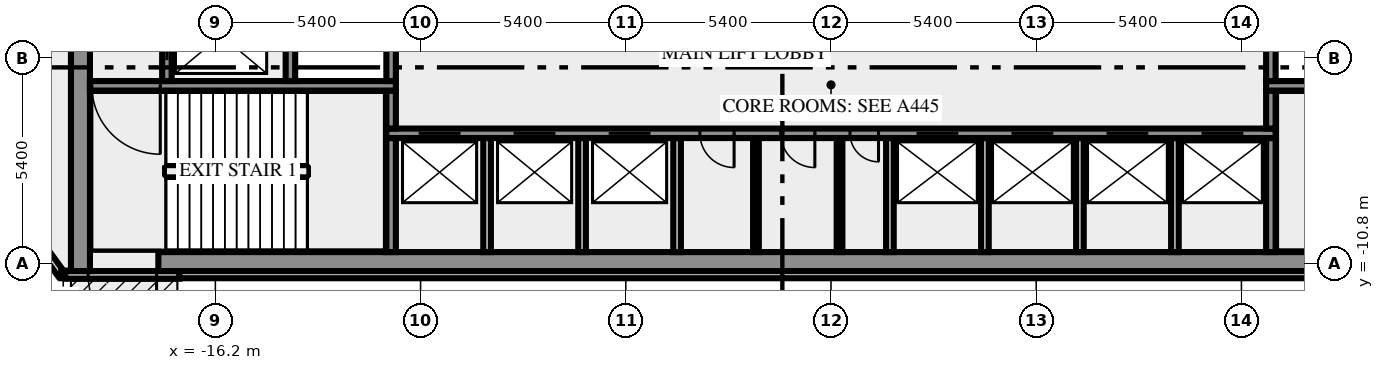
"""IFC4 building model, lengths in metres.
Left out: names, types, materials, properties, quantities, classifications, styles, units other than length and angle.
Written with IfcOpenShell. Run it as: python <this file> out.ifc"""

import sys

from ifc_helpers import new_model, si_unit, direction, frame, frame_2d, origin, place, context, subcontext, project, spatial, rectangle, extrude, element, fill, save


model = new_model("IFC4")
c1 = context("Model", 3, precision=1e-05, world=origin(), true_north=direction((0.0, 1.0)))
c2 = subcontext(c1, "Body", "Model", "MODEL_VIEW")
j1 = project(units=[si_unit("LENGTHUNIT", "METRE"), si_unit("PLANEANGLEUNIT", "RADIAN")], contexts=[c1])
p1 = place(None, origin())
s1 = spatial("IfcSite", under=j1, at=p1, CompositionType="ELEMENT")
p2 = place(p1, origin())
s2 = spatial("IfcBuilding", under=s1, at=p2, CompositionType="ELEMENT")
p3 = place(p2, origin())
s3 = spatial("IfcBuildingStorey", under=s2, at=p3, CompositionType="ELEMENT", Elevation=0.0)
p4 = place(p3, frame((-21.833, -8.909, 0.0), z_axis=(0.0, 0.0, 1.0), x_axis=(0.587766567315, -0.809030569476, 0.0)))
e1 = element("IfcWall", 1, at=p4, inside=s3, PredefinedType="SOLIDWALL", context=c2, shape_type="SweptSolid", body=[
    extrude(rectangle(XDim=2.688, YDim=0.2, at=frame_2d((1.344, 0.0))), origin(), (0.0, 0.0, 1.0), 5.6),
])
p5 = place(p3, frame((-20.256, -11.088, 0.0), z_axis=(0.0, 0.0, 1.0), x_axis=(1.0, 0.0, 0.0)))
e2 = element("IfcWall", 2, at=p5, inside=s3, PredefinedType="SOLIDWALL", context=c2, shape_type="SweptSolid", body=[
    extrude(rectangle(XDim=0.105, YDim=0.2, at=frame_2d((0.053, 0.0))), origin(), (0.0, 0.0, 1.0), 5.6),
])
p6 = place(p3, frame((-17.143, -11.1, 0.0), z_axis=(0.0, 0.0, 1.0), x_axis=(-1.0, 0.0, 0.0)))
e3 = element("IfcWall", 3, at=p6, inside=s3, PredefinedType="SOLIDWALL", context=c2, shape_type="SweptSolid", body=[
    extrude(rectangle(XDim=3.008, YDim=0.2, at=frame_2d((1.504, 0.0))), origin(), (0.0, 0.0, 1.0), 5.6),
])
p7 = place(p6, frame((0.604, 0.0, 0.0)))
e4 = element("IfcOpeningElement", 4, at=p7, cuts=e3, PredefinedType="OPENING", context=c2, shape_type="SweptSolid", body=[
    extrude(rectangle(XDim=1.8, YDim=2.2, at=frame_2d((0.9, 1.1))), frame((0.0, 0.11, 0.0), z_axis=(0.0, -1.0, 0.0), x_axis=(1.0, 0.0, 0.0)), (0.0, 0.0, 1.0), 0.22),
])
p8 = place(p3, frame((-17.143, -11.088, 0.0), z_axis=(0.0, 0.0, 1.0), x_axis=(1.0, 0.0, 0.0)))
e5 = element("IfcWall", 5, at=p8, inside=s3, PredefinedType="SOLIDWALL", context=c2, shape_type="SweptSolid", body=[
    extrude(rectangle(XDim=34.287, YDim=0.2, at=frame_2d((17.143, 0.0))), origin(), (0.0, 0.0, 1.0), 5.6),
])
p9 = place(p3, frame((-19.75, -11.0, 0.0), z_axis=(0.0, 0.0, 1.0), x_axis=(0.0, 1.0, 0.0)))
e6 = element("IfcWall", 6, at=p9, inside=s3, PredefinedType="SHEAR", context=c2, shape_type="SweptSolid", body=[
    extrude(rectangle(XDim=9.3, YDim=0.5, at=frame_2d((4.65, 0.0))), origin(), (0.0, 0.0, 1.0), 5.6),
])
p10 = place(p3, frame((-17.7, -10.75, 0.0), z_axis=(0.0, 0.0, 1.0), x_axis=(1.0, 0.0, 0.0)))
e7 = element("IfcWall", 7, at=p10, inside=s3, PredefinedType="SHEAR", context=c2, shape_type="SweptSolid", body=[
    extrude(rectangle(XDim=35.4, YDim=0.5, at=frame_2d((17.7, 0.0))), origin(), (0.0, 0.0, 1.0), 5.6),
])
p11 = place(p3, frame((-11.575, -10.5, 0.0), z_axis=(0.0, 0.0, 1.0), x_axis=(0.0, 1.0, 0.0)))
e8 = element("IfcWall", 8, at=p11, inside=s3, PredefinedType="SHEAR", context=c2, shape_type="SweptSolid", body=[
    extrude(rectangle(XDim=3.0, YDim=0.25, at=frame_2d((1.5, 0.0))), origin(), (0.0, 0.0, 1.0), 5.6),
])
for number, where, z_axis, x_axis in (
    (9, (-9.05, -10.5, 0.0), (0.0, 0.0, 1.0), (0.0, 1.0, 0.0)),
    (10, (-6.55, -10.5, 0.0), (0.0, 0.0, 1.0), (0.0, 1.0, 0.0)),
    (11, (-4.05, -10.5, 0.0), (0.0, 0.0, 1.0), (0.0, 1.0, 0.0)),
):
    element("IfcWall", number, at=place(p3, frame(where, z_axis=z_axis, x_axis=x_axis)), inside=s3, PredefinedType="SOLIDWALL", context=c2, shape_type="SweptSolid", body=[
        extrude(rectangle(XDim=3.0, YDim=0.2, at=frame_2d((1.5, 0.0))), origin(), (0.0, 0.0, 1.0), 5.6),
    ])
for number, where, z_axis, x_axis in (
    (12, (-1.975, -10.5, 0.0), (0.0, 0.0, 1.0), (0.0, 1.0, 0.0)),
    (13, (0.225, -10.5, 0.0), (0.0, 0.0, 1.0), (0.0, 1.0, 0.0)),
):
    element("IfcWall", number, at=place(p3, frame(where, z_axis=z_axis, x_axis=x_axis)), inside=s3, PredefinedType="PARTITIONING", context=c2, shape_type="SweptSolid", body=[
        extrude(rectangle(XDim=3.0, YDim=0.15, at=frame_2d((1.5, 0.0))), origin(), (0.0, 0.0, 1.0), 5.6),
    ])
for number, where, z_axis, x_axis in (
    (14, (1.55, -10.5, 0.0), (0.0, 0.0, 1.0), (0.0, 1.0, 0.0)),
    (15, (4.05, -10.5, 0.0), (0.0, 0.0, 1.0), (0.0, 1.0, 0.0)),
    (16, (6.55, -10.5, 0.0), (0.0, 0.0, 1.0), (0.0, 1.0, 0.0)),
    (17, (9.05, -10.5, 0.0), (0.0, 0.0, 1.0), (0.0, 1.0, 0.0)),
):
    element("IfcWall", number, at=place(p3, frame(where, z_axis=z_axis, x_axis=x_axis)), inside=s3, PredefinedType="SOLIDWALL", context=c2, shape_type="SweptSolid", body=[
        extrude(rectangle(XDim=3.0, YDim=0.2, at=frame_2d((1.5, 0.0))), origin(), (0.0, 0.0, 1.0), 5.6),
    ])
p12 = place(p3, frame((11.575, -10.5, 0.0), z_axis=(0.0, 0.0, 1.0), x_axis=(0.0, 1.0, 0.0)))
e18 = element("IfcWall", 18, at=p12, inside=s3, PredefinedType="SHEAR", context=c2, shape_type="SweptSolid", body=[
    extrude(rectangle(XDim=3.0, YDim=0.25, at=frame_2d((1.5, 0.0))), origin(), (0.0, 0.0, 1.0), 5.6),
])
p13 = place(p3, frame((11.7, -7.375, 0.0), z_axis=(0.0, 0.0, 1.0), x_axis=(-1.0, 0.0, 0.0)))
e19 = element("IfcWall", 19, at=p13, inside=s3, PredefinedType="SHEAR", context=c2, shape_type="SweptSolid", body=[
    extrude(rectangle(XDim=23.4, YDim=0.25, at=frame_2d((11.7, 0.0))), origin(), (0.0, 0.0, 1.0), 5.6),
])
p14 = place(p13, frame((21.45, 0.0, 0.0)))
e20 = element("IfcOpeningElement", 20, at=p14, cuts=e19, PredefinedType="OPENING", context=c2, shape_type="SweptSolid", body=[
    extrude(rectangle(XDim=1.1, YDim=2.1, at=frame_2d((0.55, 1.05))), frame((0.0, 0.135, 0.0), z_axis=(0.0, -1.0, 0.0), x_axis=(1.0, 0.0, 0.0)), (0.0, 0.0, 1.0), 0.27),
])
p15 = place(p13, frame((18.95, 0.0, 0.0)))
e21 = element("IfcOpeningElement", 21, at=p15, cuts=e19, PredefinedType="OPENING", context=c2, shape_type="SweptSolid", body=[
    extrude(rectangle(XDim=1.1, YDim=2.1, at=frame_2d((0.55, 1.05))), frame((0.0, 0.135, 0.0), z_axis=(0.0, -1.0, 0.0), x_axis=(1.0, 0.0, 0.0)), (0.0, 0.0, 1.0), 0.27),
])
p16 = place(p13, frame((16.45, 0.0, 0.0)))
e22 = element("IfcOpeningElement", 22, at=p16, cuts=e19, PredefinedType="OPENING", context=c2, shape_type="SweptSolid", body=[
    extrude(rectangle(XDim=1.1, YDim=2.1, at=frame_2d((0.55, 1.05))), frame((0.0, 0.135, 0.0), z_axis=(0.0, -1.0, 0.0), x_axis=(1.0, 0.0, 0.0)), (0.0, 0.0, 1.0), 0.27),
])
p17 = place(p13, frame((14.25, 0.0, 0.0)))
e23 = element("IfcOpeningElement", 23, at=p17, cuts=e19, PredefinedType="OPENING", context=c2, shape_type="SweptSolid", body=[
    extrude(rectangle(XDim=0.9, YDim=2.1, at=frame_2d((0.45, 1.05))), frame((0.0, 0.135, 0.0), z_axis=(0.0, -1.0, 0.0), x_axis=(1.0, 0.0, 0.0)), (0.0, 0.0, 1.0), 0.27),
])
p18 = place(p13, frame((12.125, 0.0, 0.0)))
e24 = element("IfcOpeningElement", 24, at=p18, cuts=e19, PredefinedType="OPENING", context=c2, shape_type="SweptSolid", body=[
    extrude(rectangle(XDim=0.9, YDim=2.1, at=frame_2d((0.45, 1.05))), frame((0.0, 0.135, 0.0), z_axis=(0.0, -1.0, 0.0), x_axis=(1.0, 0.0, 0.0)), (0.0, 0.0, 1.0), 0.27),
])
p19 = place(p13, frame((10.45, 0.0, 0.0)))
e25 = element("IfcOpeningElement", 25, at=p19, cuts=e19, PredefinedType="OPENING", context=c2, shape_type="SweptSolid", body=[
    extrude(rectangle(XDim=0.75, YDim=2.1, at=frame_2d((0.375, 1.05))), frame((0.0, 0.135, 0.0), z_axis=(0.0, -1.0, 0.0), x_axis=(1.0, 0.0, 0.0)), (0.0, 0.0, 1.0), 0.27),
])
p20 = place(p13, frame((8.35, 0.0, 0.0)))
e26 = element("IfcOpeningElement", 26, at=p20, cuts=e19, PredefinedType="OPENING", context=c2, shape_type="SweptSolid", body=[
    extrude(rectangle(XDim=1.1, YDim=2.1, at=frame_2d((0.55, 1.05))), frame((0.0, 0.135, 0.0), z_axis=(0.0, -1.0, 0.0), x_axis=(1.0, 0.0, 0.0)), (0.0, 0.0, 1.0), 0.27),
])
p21 = place(p13, frame((5.85, 0.0, 0.0)))
e27 = element("IfcOpeningElement", 27, at=p21, cuts=e19, PredefinedType="OPENING", context=c2, shape_type="SweptSolid", body=[
    extrude(rectangle(XDim=1.1, YDim=2.1, at=frame_2d((0.55, 1.05))), frame((0.0, 0.135, 0.0), z_axis=(0.0, -1.0, 0.0), x_axis=(1.0, 0.0, 0.0)), (0.0, 0.0, 1.0), 0.27),
])
p22 = place(p13, frame((3.35, 0.0, 0.0)))
e28 = element("IfcOpeningElement", 28, at=p22, cuts=e19, PredefinedType="OPENING", context=c2, shape_type="SweptSolid", body=[
    extrude(rectangle(XDim=1.1, YDim=2.1, at=frame_2d((0.55, 1.05))), frame((0.0, 0.135, 0.0), z_axis=(0.0, -1.0, 0.0), x_axis=(1.0, 0.0, 0.0)), (0.0, 0.0, 1.0), 0.27),
])
p23 = place(p13, frame((0.85, 0.0, 0.0)))
e29 = element("IfcOpeningElement", 29, at=p23, cuts=e19, PredefinedType="OPENING", context=c2, shape_type="SweptSolid", body=[
    extrude(rectangle(XDim=1.1, YDim=2.1, at=frame_2d((0.55, 1.05))), frame((0.0, 0.135, 0.0), z_axis=(0.0, -1.0, 0.0), x_axis=(1.0, 0.0, 0.0)), (0.0, 0.0, 1.0), 0.27),
])
for number, where, z_axis, x_axis in (
    (30, (-11.575, -7.25, 0.0), (0.0, 0.0, 1.0), (0.0, 1.0, 0.0)),
    (31, (11.575, -7.25, 0.0), (0.0, 0.0, 1.0), (0.0, 1.0, 0.0)),
):
    element("IfcWall", number, at=place(p3, frame(where, z_axis=z_axis, x_axis=x_axis)), inside=s3, PredefinedType="SHEAR", context=c2, shape_type="SweptSolid", body=[
        extrude(rectangle(XDim=1.0, YDim=0.25, at=frame_2d((0.5, 0.0))), origin(), (0.0, 0.0, 1.0), 5.6),
    ])
p24 = place(p3, frame((-11.45, -6.125, 0.0), z_axis=(0.0, 0.0, 1.0), x_axis=(-1.0, 0.0, 0.0)))
e32 = element("IfcWall", 32, at=p24, inside=s3, PredefinedType="SHEAR", context=c2, shape_type="SweptSolid", body=[
    extrude(rectangle(XDim=8.05, YDim=0.25, at=frame_2d((4.025, 0.0))), origin(), (0.0, 0.0, 1.0), 5.6),
])
p25 = place(p24, frame((6.2, 0.0, 0.0)))
e33 = element("IfcOpeningElement", 33, at=p25, cuts=e32, PredefinedType="OPENING", context=c2, shape_type="SweptSolid", body=[
    extrude(rectangle(XDim=1.8, YDim=2.1, at=frame_2d((0.9, 1.05))), frame((0.0, 0.135, 0.0), z_axis=(0.0, -1.0, 0.0), x_axis=(1.0, 0.0, 0.0)), (0.0, 0.0, 1.0), 0.27),
])
p26 = place(p3, frame((19.5, -6.125, 0.0), z_axis=(0.0, 0.0, 1.0), x_axis=(-1.0, 0.0, 0.0)))
e34 = element("IfcWall", 34, at=p26, inside=s3, PredefinedType="SHEAR", context=c2, shape_type="SweptSolid", body=[
    extrude(rectangle(XDim=8.05, YDim=0.25, at=frame_2d((4.025, 0.0))), origin(), (0.0, 0.0, 1.0), 5.6),
])
p27 = place(p26, frame((0.05, 0.0, 0.0)))
e35 = element("IfcOpeningElement", 35, at=p27, cuts=e34, PredefinedType="OPENING", context=c2, shape_type="SweptSolid", body=[
    extrude(rectangle(XDim=1.8, YDim=2.1, at=frame_2d((0.9, 1.05))), frame((0.0, 0.135, 0.0), z_axis=(0.0, -1.0, 0.0), x_axis=(1.0, 0.0, 0.0)), (0.0, 0.0, 1.0), 0.27),
])
p28 = place(p3, frame((-17.475, -6.0, 0.0), z_axis=(0.0, 0.0, 1.0), x_axis=(0.0, 1.0, 0.0)))
e36 = element("IfcWall", 36, at=p28, inside=s3, PredefinedType="SHEAR", context=c2, shape_type="SweptSolid", body=[
    extrude(rectangle(XDim=4.3, YDim=0.25, at=frame_2d((2.15, 0.0))), origin(), (0.0, 0.0, 1.0), 5.6),
])
p29 = place(p28, frame((0.55, 0.0, 0.0)))
e37 = element("IfcOpeningElement", 37, at=p29, cuts=e36, PredefinedType="OPENING", context=c2, shape_type="SweptSolid", body=[
    extrude(rectangle(XDim=1.3, YDim=2.1, at=frame_2d((0.65, 1.05))), frame((0.0, 0.135, 0.0), z_axis=(0.0, -1.0, 0.0), x_axis=(1.0, 0.0, 0.0)), (0.0, 0.0, 1.0), 0.27),
])
p30 = place(p3, frame((-14.225, -6.0, 0.0), z_axis=(0.0, 0.0, 1.0), x_axis=(0.0, 1.0, 0.0)))
e38 = element("IfcWall", 38, at=p30, inside=s3, PredefinedType="SHEAR", context=c2, shape_type="SweptSolid", body=[
    extrude(rectangle(XDim=4.3, YDim=0.25, at=frame_2d((2.15, 0.0))), origin(), (0.0, 0.0, 1.0), 5.6),
])
for number, where, z_axis, x_axis in (
    (39, (-11.575, -6.0, 0.0), (0.0, 0.0, 1.0), (0.0, 1.0, 0.0)),
    (40, (11.575, -6.0, 0.0), (0.0, 0.0, 1.0), (0.0, 1.0, 0.0)),
):
    element("IfcWall", number, at=place(p3, frame(where, z_axis=z_axis, x_axis=x_axis)), inside=s3, PredefinedType="SHEAR", context=c2, shape_type="SweptSolid", body=[
        extrude(rectangle(XDim=1.75, YDim=0.25, at=frame_2d((0.875, 0.0))), origin(), (0.0, 0.0, 1.0), 5.6),
    ])
p31 = place(p7, origin())
e41 = element("IfcDoor", 41, at=p31, inside=s3, OperationType="DOUBLE_DOOR_SINGLE_SWING", PredefinedType="DOOR", context=c2, shape_type="SweptSolid", body=[
    extrude(rectangle(XDim=1.8, YDim=2.2, at=frame_2d((0.9, 1.1))), frame((0.0, 0.025, 0.0), z_axis=(0.0, -1.0, 0.0), x_axis=(1.0, 0.0, 0.0)), (0.0, 0.0, 1.0), 0.05),
])
fill(e4, e41)
p32 = place(p14, origin())
e42 = element("IfcDoor", 42, at=p32, inside=s3, OperationType="DOUBLE_DOOR_SLIDING", PredefinedType="DOOR", context=c2, shape_type="SweptSolid", body=[
    extrude(rectangle(XDim=1.1, YDim=2.1, at=frame_2d((0.55, 1.05))), frame((0.0, 0.025, 0.0), z_axis=(0.0, -1.0, 0.0), x_axis=(1.0, 0.0, 0.0)), (0.0, 0.0, 1.0), 0.05),
])
fill(e20, e42)
p33 = place(p15, origin())
e43 = element("IfcDoor", 43, at=p33, inside=s3, OperationType="DOUBLE_DOOR_SLIDING", PredefinedType="DOOR", context=c2, shape_type="SweptSolid", body=[
    extrude(rectangle(XDim=1.1, YDim=2.1, at=frame_2d((0.55, 1.05))), frame((0.0, 0.025, 0.0), z_axis=(0.0, -1.0, 0.0), x_axis=(1.0, 0.0, 0.0)), (0.0, 0.0, 1.0), 0.05),
])
fill(e21, e43)
p34 = place(p16, origin())
e44 = element("IfcDoor", 44, at=p34, inside=s3, OperationType="DOUBLE_DOOR_SLIDING", PredefinedType="DOOR", context=c2, shape_type="SweptSolid", body=[
    extrude(rectangle(XDim=1.1, YDim=2.1, at=frame_2d((0.55, 1.05))), frame((0.0, 0.025, 0.0), z_axis=(0.0, -1.0, 0.0), x_axis=(1.0, 0.0, 0.0)), (0.0, 0.0, 1.0), 0.05),
])
fill(e22, e44)
p35 = place(p17, origin())
e45 = element("IfcDoor", 45, at=p35, inside=s3, OperationType="SINGLE_SWING_RIGHT", PredefinedType="DOOR", context=c2, shape_type="SweptSolid", body=[
    extrude(rectangle(XDim=0.9, YDim=2.1, at=frame_2d((0.45, 1.05))), frame((0.0, 0.025, 0.0), z_axis=(0.0, -1.0, 0.0), x_axis=(1.0, 0.0, 0.0)), (0.0, 0.0, 1.0), 0.05),
])
fill(e23, e45)
p36 = place(p18, origin())
e46 = element("IfcDoor", 46, at=p36, inside=s3, OperationType="SINGLE_SWING_RIGHT", PredefinedType="DOOR", context=c2, shape_type="SweptSolid", body=[
    extrude(rectangle(XDim=0.9, YDim=2.1, at=frame_2d((0.45, 1.05))), frame((0.0, 0.025, 0.0), z_axis=(0.0, -1.0, 0.0), x_axis=(1.0, 0.0, 0.0)), (0.0, 0.0, 1.0), 0.05),
])
fill(e24, e46)
p37 = place(p19, origin())
e47 = element("IfcDoor", 47, at=p37, inside=s3, OperationType="SINGLE_SWING_LEFT", PredefinedType="DOOR", context=c2, shape_type="SweptSolid", body=[
    extrude(rectangle(XDim=0.75, YDim=2.1, at=frame_2d((0.375, 1.05))), frame((0.0, 0.025, 0.0), z_axis=(0.0, -1.0, 0.0), x_axis=(1.0, 0.0, 0.0)), (0.0, 0.0, 1.0), 0.05),
])
fill(e25, e47)
p38 = place(p20, origin())
e48 = element("IfcDoor", 48, at=p38, inside=s3, OperationType="DOUBLE_DOOR_SLIDING", PredefinedType="DOOR", context=c2, shape_type="SweptSolid", body=[
    extrude(rectangle(XDim=1.1, YDim=2.1, at=frame_2d((0.55, 1.05))), frame((0.0, 0.025, 0.0), z_axis=(0.0, -1.0, 0.0), x_axis=(1.0, 0.0, 0.0)), (0.0, 0.0, 1.0), 0.05),
])
fill(e26, e48)
p39 = place(p21, origin())
e49 = element("IfcDoor", 49, at=p39, inside=s3, OperationType="DOUBLE_DOOR_SLIDING", PredefinedType="DOOR", context=c2, shape_type="SweptSolid", body=[
    extrude(rectangle(XDim=1.1, YDim=2.1, at=frame_2d((0.55, 1.05))), frame((0.0, 0.025, 0.0), z_axis=(0.0, -1.0, 0.0), x_axis=(1.0, 0.0, 0.0)), (0.0, 0.0, 1.0), 0.05),
])
fill(e27, e49)
p40 = place(p22, origin())
e50 = element("IfcDoor", 50, at=p40, inside=s3, OperationType="DOUBLE_DOOR_SLIDING", PredefinedType="DOOR", context=c2, shape_type="SweptSolid", body=[
    extrude(rectangle(XDim=1.1, YDim=2.1, at=frame_2d((0.55, 1.05))), frame((0.0, 0.025, 0.0), z_axis=(0.0, -1.0, 0.0), x_axis=(1.0, 0.0, 0.0)), (0.0, 0.0, 1.0), 0.05),
])
fill(e28, e50)
p41 = place(p23, origin())
e51 = element("IfcDoor", 51, at=p41, inside=s3, OperationType="DOUBLE_DOOR_SLIDING", PredefinedType="DOOR", context=c2, shape_type="SweptSolid", body=[
    extrude(rectangle(XDim=1.1, YDim=2.1, at=frame_2d((0.55, 1.05))), frame((0.0, 0.025, 0.0), z_axis=(0.0, -1.0, 0.0), x_axis=(1.0, 0.0, 0.0)), (0.0, 0.0, 1.0), 0.05),
])
fill(e29, e51)
p42 = place(p25, origin())
e52 = element("IfcDoor", 52, at=p42, inside=s3, OperationType="DOUBLE_DOOR_SINGLE_SWING", PredefinedType="DOOR", context=c2, shape_type="SweptSolid", body=[
    extrude(rectangle(XDim=1.8, YDim=2.1, at=frame_2d((0.9, 1.05))), frame((0.0, 0.025, 0.0), z_axis=(0.0, -1.0, 0.0), x_axis=(1.0, 0.0, 0.0)), (0.0, 0.0, 1.0), 0.05),
])
fill(e33, e52)
p43 = place(p29, origin())
e53 = element("IfcDoor", 53, at=p43, inside=s3, OperationType="DOUBLE_DOOR_SLIDING", PredefinedType="DOOR", context=c2, shape_type="SweptSolid", body=[
    extrude(rectangle(XDim=1.3, YDim=2.1, at=frame_2d((0.65, 1.05))), frame((0.0, 0.025, 0.0), z_axis=(0.0, -1.0, 0.0), x_axis=(1.0, 0.0, 0.0)), (0.0, 0.0, 1.0), 0.05),
])
fill(e37, e53)
save(model, sys.argv[1])
